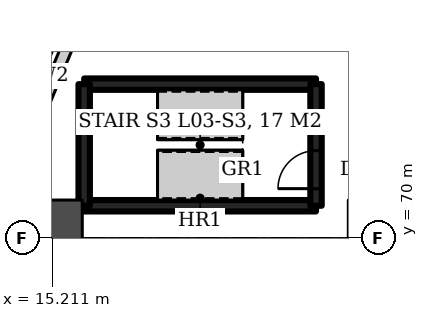
"""IFC4 building model, lengths in metres.
Left out: names, types, materials, properties, quantities, classifications, styles, units other than length and angle.
Written with IfcOpenShell. Run it as: python <this file> out.ifc"""

import sys

from ifc_helpers import new_model, si_unit, direction, frame, frame_2d, origin, origin_2d, place, context, subcontext, project, spatial, rectangle, extrude, element, fill, save


model = new_model("IFC4")
c1 = context("Model", 3, precision=1e-05, world=origin(), true_north=direction((0.0, 1.0)))
c2 = subcontext(c1, "Body", "Model", "MODEL_VIEW")
j1 = project(units=[si_unit("LENGTHUNIT", "METRE"), si_unit("PLANEANGLEUNIT", "RADIAN")], contexts=[c1])
p1 = place(None, origin())
s1 = spatial("IfcSite", under=j1, at=p1, CompositionType="ELEMENT")
p2 = place(p1, origin())
s2 = spatial("IfcBuilding", under=s1, at=p2, CompositionType="ELEMENT")
p3 = place(p2, frame((0.0, 0.0, 20.0)))
s3 = spatial("IfcBuildingStorey", under=s2, at=p3, CompositionType="ELEMENT", Elevation=20.0)
p4 = place(p3, frame((15.0, 70.0, 0.0), z_axis=(0.0, 0.0, 1.0), x_axis=(1.0, 0.0, 0.0)))
e1 = element("IfcColumn", 1, at=p4, inside=s3, PredefinedType="COLUMN", context=c2, shape_type="SweptSolid", body=[
    extrude(rectangle(XDim=2.0, YDim=2.0, at=origin_2d()), origin(), (0.0, 0.0, 1.0), 6.0),
])
p5 = place(p3, frame((15.734, 75.35, 0.0), z_axis=(0.0, 0.0, 1.0), x_axis=(-0.382709424419, -0.923868765822, 0.0)))
e2 = element("IfcWall", 2, at=p5, inside=s3, PredefinedType="SOLIDWALL", context=c2, shape_type="SweptSolid", body=[
    extrude(rectangle(XDim=2.793, YDim=0.3, at=frame_2d((1.397, 0.0))), origin(), (0.0, 0.0, 1.0), 5.7),
])
for number, where, z_axis, x_axis in (
    (3, (16.05, 70.85, 0.0), (0.0, 0.0, 1.0), (1.0, 0.0, 0.0)),
    (4, (16.05, 74.05, 0.0), (0.0, 0.0, 1.0), (1.0, 0.0, 0.0)),
):
    element("IfcWall", number, at=place(p3, frame(where, z_axis=z_axis, x_axis=x_axis)), inside=s3, PredefinedType="SHEAR", context=c2, shape_type="SweptSolid", body=[
        extrude(rectangle(XDim=6.1, YDim=0.3, at=frame_2d((3.05, 0.0))), origin(), (0.0, 0.0, 1.0), 6.0),
    ])
p6 = place(p3, frame((16.05, 70.85, 0.0), z_axis=(0.0, 0.0, 1.0), x_axis=(0.0, 1.0, 0.0)))
e5 = element("IfcWall", 5, at=p6, inside=s3, PredefinedType="SHEAR", context=c2, shape_type="SweptSolid", body=[
    extrude(rectangle(XDim=3.2, YDim=0.3, at=frame_2d((1.6, 0.0))), origin(), (0.0, 0.0, 1.0), 6.0),
])
p7 = place(p3, frame((22.15, 70.85, 0.0), z_axis=(0.0, 0.0, 1.0), x_axis=(0.0, 1.0, 0.0)))
e6 = element("IfcWall", 6, at=p7, inside=s3, PredefinedType="SHEAR", context=c2, shape_type="SweptSolid", body=[
    extrude(rectangle(XDim=3.2, YDim=0.3, at=frame_2d((1.6, 0.0))), origin(), (0.0, 0.0, 1.0), 6.0),
])
p8 = place(p7, frame((0.45, 0.0, 0.0)))
e7 = element("IfcOpeningElement", 7, at=p8, cuts=e6, PredefinedType="OPENING", context=c2, shape_type="SweptSolid", body=[
    extrude(rectangle(XDim=1.0, YDim=2.1, at=frame_2d((0.5, 1.05))), frame((0.0, 0.16, 0.0), z_axis=(0.0, -1.0, 0.0), x_axis=(1.0, 0.0, 0.0)), (0.0, 0.0, 1.0), 0.32),
])
p9 = place(p8, origin())
e8 = element("IfcDoor", 8, at=p9, inside=s3, OperationType="SINGLE_SWING_LEFT", PredefinedType="DOOR", context=c2, shape_type="SweptSolid", body=[
    extrude(rectangle(XDim=1.0, YDim=2.1, at=frame_2d((0.5, 1.05))), frame((0.0, 0.025, 0.0), z_axis=(0.0, -1.0, 0.0), x_axis=(1.0, 0.0, 0.0)), (0.0, 0.0, 1.0), 0.05),
])
fill(e7, e8)
save(model, sys.argv[1])
